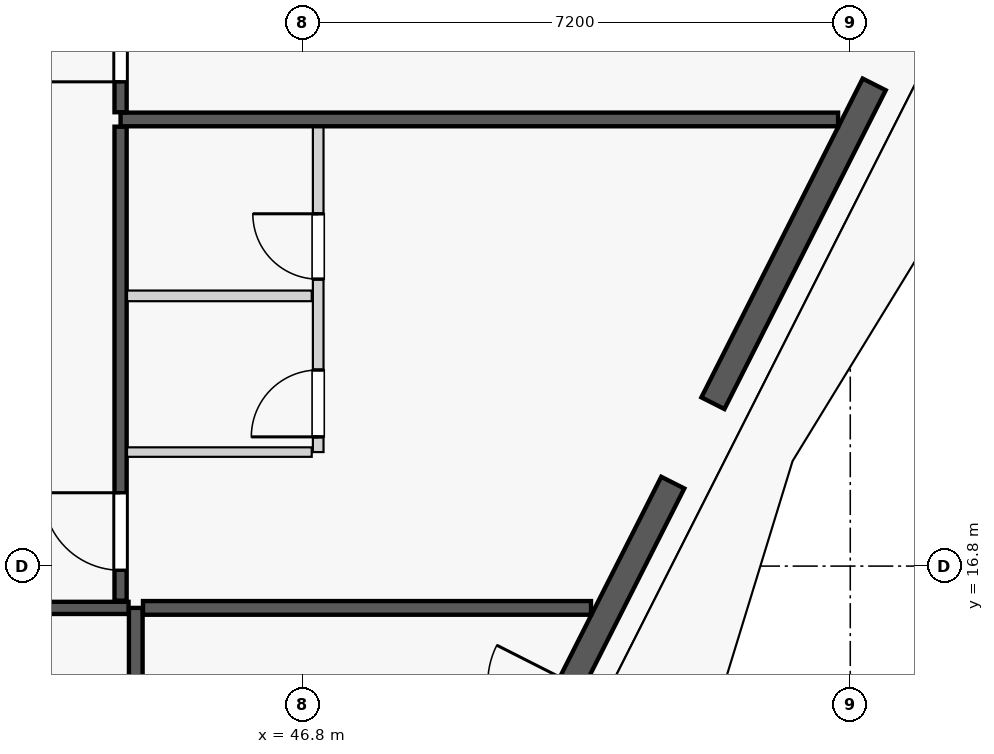
"""IFC4 building model, lengths in metres.
Left out: names, types, materials, properties, quantities, classifications, styles, units other than length and angle.
Written with IfcOpenShell. Run it as: python <this file> out.ifc"""

import sys

from ifc_helpers import new_model, si_unit, direction, frame, frame_2d, origin, origin_2d, place, context, subcontext, project, spatial, rectangle, extrude, element, fill, save


model = new_model("IFC4")
c1 = context("Model", 3, precision=1e-05, world=origin(), true_north=direction((0.0, 1.0)))
c2 = subcontext(c1, "Body", "Model", "MODEL_VIEW")
j1 = project(units=[si_unit("LENGTHUNIT", "METRE"), si_unit("PLANEANGLEUNIT", "RADIAN")], contexts=[c1])
p1 = place(None, origin())
s1 = spatial("IfcSite", under=j1, at=p1, CompositionType="ELEMENT")
p2 = place(p1, origin())
s2 = spatial("IfcBuilding", under=s1, at=p2, CompositionType="ELEMENT")
p3 = place(p2, frame((0.0, 0.0, 186.1)))
s3 = spatial("IfcBuildingStorey", under=s2, at=p3, CompositionType="ELEMENT", Elevation=186.1)
for number, where, z_axis, x_axis in (
    (1, (51.858, 18.429, 0.0), (0.0, 0.0, 1.0), (1.0, 0.0, 0.0)),
    (2, (54.547, 23.668, 0.0), (0.0, 0.0, 1.0), (1.0, 0.0, 0.0)),
):
    element("IfcColumn", number, at=place(p3, frame(where, z_axis=z_axis, x_axis=x_axis)), inside=s3, PredefinedType="COLUMN", context=c2, shape_type="SweptSolid", body=[
        extrude(rectangle(XDim=0.9, YDim=0.9, at=origin_2d()), origin(), (0.0, 0.0, 1.0), 3.55),
    ])
p4 = place(p3, frame((49.448, 13.517, 0.0), z_axis=(0.0, 0.0, 1.0), x_axis=(0.451544279509, 0.892248711763, 0.0)))
e3 = element("IfcWall", 3, at=p4, inside=s3, PredefinedType="STANDARD", context=c2, shape_type="SweptSolid", body=[
    extrude(rectangle(XDim=4.91, YDim=0.34, at=frame_2d((2.455, 0.0))), origin(), (0.0, 0.0, 1.0), 2.883),
])
p5 = place(p4, frame((0.856, 0.0, 0.0)))
e4 = element("IfcOpeningElement", 4, at=p5, cuts=e3, PredefinedType="OPENING", context=c2, shape_type="SweptSolid", body=[
    extrude(rectangle(XDim=1.1, YDim=2.25, at=frame_2d((0.55, 1.125))), frame((0.0, 0.18, 0.0), z_axis=(0.0, -1.0, 0.0), x_axis=(1.0, 0.0, 0.0)), (0.0, 0.0, 1.0), 0.36),
])
p6 = place(p4, frame((3.457, 0.0, 0.75)))
e5 = element("IfcOpeningElement", 5, at=p6, cuts=e3, PredefinedType="OPENING", context=c2, shape_type="SweptSolid", body=[
    extrude(rectangle(XDim=1.1, YDim=1.983, at=frame_2d((0.55, 0.991))), frame((0.0, 0.18, 0.0), z_axis=(0.0, -1.0, 0.0), x_axis=(1.0, 0.0, 0.0)), (0.0, 0.0, 1.0), 0.36),
])
p7 = place(p3, frame((52.193, 18.943, 0.0), z_axis=(0.0, 0.0, 1.0), x_axis=(0.451447222193, 0.892297823361, 0.0)))
e6 = element("IfcWall", 6, at=p7, inside=s3, PredefinedType="STANDARD", context=c2, shape_type="SweptSolid", body=[
    extrude(rectangle(XDim=4.7, YDim=0.34, at=frame_2d((2.35, 0.0))), origin(), (0.0, 0.0, 1.0), 2.883),
])
p8 = place(p7, frame((1.8, 0.0, 0.75)))
e7 = element("IfcOpeningElement", 7, at=p8, cuts=e6, PredefinedType="OPENING", context=c2, shape_type="SweptSolid", body=[
    extrude(rectangle(XDim=1.1, YDim=1.983, at=frame_2d((0.55, 0.991))), frame((0.0, 0.18, 0.0), z_axis=(0.0, -1.0, 0.0), x_axis=(1.0, 0.0, 0.0)), (0.0, 0.0, 1.0), 0.36),
])
p9 = place(p3, frame((44.6, 5.968, 0.0), z_axis=(0.0, 0.0, 1.0), x_axis=(0.0, 1.0, 0.0)))
e8 = element("IfcWall", 8, at=p9, inside=s3, PredefinedType="PARTITIONING", context=c2, shape_type="SweptSolid", body=[
    extrude(rectangle(XDim=10.282, YDim=0.18, at=frame_2d((5.141, 0.0))), origin(), (0.0, 0.0, 1.0), 3.35),
])
p10 = place(p3, frame((36.038, 16.25, 0.0), z_axis=(0.0, 0.0, 1.0), x_axis=(1.0, 0.0, 0.0)))
e9 = element("IfcWall", 9, at=p10, inside=s3, PredefinedType="PARTITIONING", context=c2, shape_type="SweptSolid", body=[
    extrude(rectangle(XDim=8.467, YDim=0.16, at=frame_2d((4.233, 0.0))), origin(), (0.0, 0.0, 1.0), 3.35),
])
p11 = place(p10, frame((0.355, 0.0, 0.0)))
e10 = element("IfcOpeningElement", 10, at=p11, cuts=e9, PredefinedType="OPENING", context=c2, shape_type="SweptSolid", body=[
    extrude(rectangle(XDim=1.02, YDim=2.25, at=frame_2d((0.51, 1.125))), frame((0.0, 0.09, 0.0), z_axis=(0.0, -1.0, 0.0), x_axis=(1.0, 0.0, 0.0)), (0.0, 0.0, 1.0), 0.18),
])
p12 = place(p3, frame((44.695, 16.25, 0.0), z_axis=(0.0, 0.0, 1.0), x_axis=(1.0, 0.0, 0.0)))
e11 = element("IfcWall", 11, at=p12, inside=s3, PredefinedType="PARTITIONING", context=c2, shape_type="SweptSolid", body=[
    extrude(rectangle(XDim=5.894, YDim=0.18, at=frame_2d((2.947, 0.0))), origin(), (0.0, 0.0, 1.0), 3.35),
])
p13 = place(p3, frame((44.4, 16.345, 0.0), z_axis=(0.0, 0.0, 1.0), x_axis=(0.0, 1.0, 0.0)))
e12 = element("IfcWall", 12, at=p13, inside=s3, PredefinedType="PARTITIONING", context=c2, shape_type="SweptSolid", body=[
    extrude(rectangle(XDim=6.236, YDim=0.16, at=frame_2d((3.118, 0.0))), origin(), (0.0, 0.0, 1.0), 3.35),
])
p14 = place(p13, frame((0.4, 0.0, 0.0)))
e13 = element("IfcOpeningElement", 13, at=p14, cuts=e12, PredefinedType="OPENING", context=c2, shape_type="SweptSolid", body=[
    extrude(rectangle(XDim=1.02, YDim=2.25, at=frame_2d((0.51, 1.125))), frame((0.0, 0.09, 0.0), z_axis=(0.0, -1.0, 0.0), x_axis=(1.0, 0.0, 0.0)), (0.0, 0.0, 1.0), 0.18),
])
p15 = place(p3, frame((44.485, 18.3, 0.0), z_axis=(0.0, 0.0, 1.0), x_axis=(1.0, 0.0, 0.0)))
e14 = element("IfcWall", 14, at=p15, inside=s3, PredefinedType="PARTITIONING", context=c2, shape_type="SweptSolid", body=[
    extrude(rectangle(XDim=2.43, YDim=0.125, at=frame_2d((1.215, 0.0))), origin(), (0.0, 0.0, 1.0), 2.807),
])
p16 = place(p3, frame((47.0, 18.3, 0.0), z_axis=(0.0, 0.0, 1.0), x_axis=(0.0, 1.0, 0.0)))
e15 = element("IfcWall", 15, at=p16, inside=s3, PredefinedType="PLUMBINGWALL", context=c2, shape_type="SweptSolid", body=[
    extrude(rectangle(XDim=4.281, YDim=0.14, at=frame_2d((2.141, 0.0))), origin(), (0.0, 0.0, 1.0), 3.35),
])
p17 = place(p16, frame((2.275, 0.0, 0.0)))
e16 = element("IfcOpeningElement", 16, at=p17, cuts=e15, PredefinedType="OPENING", context=c2, shape_type="SweptSolid", body=[
    extrude(rectangle(XDim=0.86, YDim=2.1, at=frame_2d((0.43, 1.05))), frame((0.0, 0.08, 0.0), z_axis=(0.0, -1.0, 0.0), x_axis=(1.0, 0.0, 0.0)), (0.0, 0.0, 1.0), 0.16),
])
p18 = place(p16, frame((0.2, 0.0, 0.0)))
e17 = element("IfcOpeningElement", 17, at=p18, cuts=e15, PredefinedType="OPENING", context=c2, shape_type="SweptSolid", body=[
    extrude(rectangle(XDim=0.88, YDim=2.15, at=frame_2d((0.44, 1.075))), frame((0.0, 0.08, 0.0), z_axis=(0.0, -1.0, 0.0), x_axis=(1.0, 0.0, 0.0)), (0.0, 0.0, 1.0), 0.16),
])
p19 = place(p3, frame((44.485, 20.355, 0.0), z_axis=(0.0, 0.0, 1.0), x_axis=(1.0, 0.0, 0.0)))
e18 = element("IfcWall", 18, at=p19, inside=s3, PredefinedType="PLUMBINGWALL", context=c2, shape_type="SweptSolid", body=[
    extrude(rectangle(XDim=2.43, YDim=0.14, at=frame_2d((1.215, 0.0))), origin(), (0.0, 0.0, 1.0), 3.35),
])
p20 = place(p3, frame((44.4, 22.676, 0.0), z_axis=(0.0, 0.0, 1.0), x_axis=(1.0, 0.0, 0.0)))
e19 = element("IfcWall", 19, at=p20, inside=s3, PredefinedType="PARTITIONING", context=c2, shape_type="SweptSolid", body=[
    extrude(rectangle(XDim=9.44, YDim=0.18, at=frame_2d((4.72, 0.0))), origin(), (0.0, 0.0, 1.0), 3.35),
])
p21 = place(p3, frame((44.4, 22.771, 0.0), z_axis=(0.0, 0.0, 1.0), x_axis=(0.0, 1.0, 0.0)))
e20 = element("IfcWall", 20, at=p21, inside=s3, PredefinedType="PARTITIONING", context=c2, shape_type="SweptSolid", body=[
    extrude(rectangle(XDim=6.236, YDim=0.16, at=frame_2d((3.118, 0.0))), origin(), (0.0, 0.0, 1.0), 3.35),
])
p22 = place(p21, frame((0.4, 0.0, 0.0)))
e21 = element("IfcOpeningElement", 21, at=p22, cuts=e20, PredefinedType="OPENING", context=c2, shape_type="SweptSolid", body=[
    extrude(rectangle(XDim=1.02, YDim=2.25, at=frame_2d((0.51, 1.125))), frame((0.0, 0.09, 0.0), z_axis=(0.0, -1.0, 0.0), x_axis=(1.0, 0.0, 0.0)), (0.0, 0.0, 1.0), 0.18),
])
p23 = place(p8, origin())
e22 = element("IfcWindow", 22, at=p23, inside=s3, PartitioningType="SINGLE_PANEL", PredefinedType="WINDOW", context=c2, shape_type="SweptSolid", body=[
    extrude(rectangle(XDim=1.1, YDim=1.983, at=frame_2d((0.55, 0.991))), frame((0.0, 0.03, 0.0), z_axis=(0.0, -1.0, 0.0), x_axis=(1.0, 0.0, 0.0)), (0.0, 0.0, 1.0), 0.06),
])
fill(e7, e22)
p24 = place(p17, origin())
e23 = element("IfcDoor", 23, at=p24, inside=s3, OperationType="SINGLE_SWING_RIGHT", PredefinedType="DOOR", context=c2, shape_type="SweptSolid", body=[
    extrude(rectangle(XDim=0.86, YDim=2.1, at=frame_2d((0.43, 1.05))), frame((0.0, 0.025, 0.0), z_axis=(0.0, -1.0, 0.0), x_axis=(1.0, 0.0, 0.0)), (0.0, 0.0, 1.0), 0.05),
])
fill(e16, e23)
p25 = place(p14, origin())
e24 = element("IfcDoor", 24, at=p25, inside=s3, OperationType="SINGLE_SWING_RIGHT", PredefinedType="DOOR", context=c2, shape_type="SweptSolid", body=[
    extrude(rectangle(XDim=1.02, YDim=2.25, at=frame_2d((0.51, 1.125))), frame((0.0, 0.025, 0.0), z_axis=(0.0, -1.0, 0.0), x_axis=(1.0, 0.0, 0.0)), (0.0, 0.0, 1.0), 0.05),
])
fill(e13, e24)
p26 = place(p18, origin())
e25 = element("IfcDoor", 25, at=p26, inside=s3, OperationType="SINGLE_SWING_LEFT", PredefinedType="DOOR", context=c2, shape_type="SweptSolid", body=[
    extrude(rectangle(XDim=0.88, YDim=2.15, at=frame_2d((0.44, 1.075))), frame((0.0, 0.025, 0.0), z_axis=(0.0, -1.0, 0.0), x_axis=(1.0, 0.0, 0.0)), (0.0, 0.0, 1.0), 0.05),
])
fill(e17, e25)
p27 = place(p22, origin())
e26 = element("IfcDoor", 26, at=p27, inside=s3, OperationType="SINGLE_SWING_LEFT", PredefinedType="DOOR", context=c2, shape_type="SweptSolid", body=[
    extrude(rectangle(XDim=1.02, YDim=2.25, at=frame_2d((0.51, 1.125))), frame((0.0, 0.025, 0.0), z_axis=(0.0, -1.0, 0.0), x_axis=(1.0, 0.0, 0.0)), (0.0, 0.0, 1.0), 0.05),
])
fill(e21, e26)
p28 = place(p6, origin())
e27 = element("IfcWindow", 27, at=p28, inside=s3, PartitioningType="SINGLE_PANEL", PredefinedType="WINDOW", context=c2, shape_type="SweptSolid", body=[
    extrude(rectangle(XDim=1.1, YDim=1.983, at=frame_2d((0.55, 0.991))), frame((0.0, 0.03, 0.0), z_axis=(0.0, -1.0, 0.0), x_axis=(1.0, 0.0, 0.0)), (0.0, 0.0, 1.0), 0.06),
])
fill(e5, e27)
save(model, sys.argv[1])
